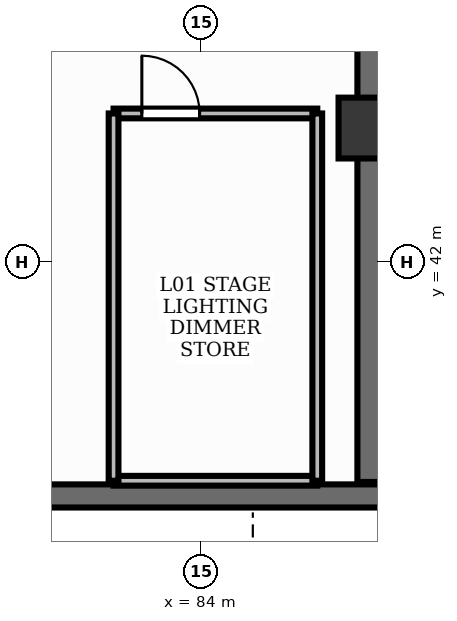
"""IFC4 building model, lengths in metres.
Left out: names, types, materials, properties, quantities, classifications, styles, units other than length and angle.
Written with IfcOpenShell. Run it as: python <this file> out.ifc"""

import sys

from ifc_helpers import new_model, si_unit, direction, frame, frame_2d, origin, origin_2d, place, context, subcontext, project, spatial, rectangle, extrude, element, fill, save


model = new_model("IFC4")
c1 = context("Model", 3, precision=1e-05, world=origin(), true_north=direction((0.0, 1.0)))
c2 = subcontext(c1, "Body", "Model", "MODEL_VIEW")
j1 = project(units=[si_unit("LENGTHUNIT", "METRE"), si_unit("PLANEANGLEUNIT", "RADIAN")], contexts=[c1])
p1 = place(None, origin())
s1 = spatial("IfcSite", under=j1, at=p1, CompositionType="ELEMENT")
p2 = place(p1, origin())
s2 = spatial("IfcBuilding", under=s1, at=p2, CompositionType="ELEMENT")
p3 = place(p2, frame((0.0, 0.0, 5.4)))
s3 = spatial("IfcBuildingStorey", under=s2, at=p3, CompositionType="ELEMENT", Elevation=5.4)
p4 = place(p3, frame((86.75, 44.2, 0.0), z_axis=(0.0, 0.0, 1.0), x_axis=(1.0, 0.0, 0.0)))
e1 = element("IfcColumn", 1, at=p4, inside=s3, PredefinedType="COLUMN", context=c2, shape_type="SweptSolid", body=[
    extrude(rectangle(XDim=1.0, YDim=1.0, at=origin_2d()), origin(), (0.0, 0.0, 1.0), 4.5),
])
p5 = place(p3, frame((86.75, 38.38, 0.0), z_axis=(0.0, 0.0, 1.0), x_axis=(0.0, 1.0, 0.0)))
e2 = element("IfcWall", 2, at=p5, inside=s3, PredefinedType="SHEAR", context=c2, shape_type="SweptSolid", body=[
    extrude(rectangle(XDim=8.41, YDim=0.38, at=frame_2d((4.205, 0.0))), origin(), (0.0, 0.0, 1.0), 4.5),
])
p6 = place(p3, frame((76.4, 38.15, 0.0), z_axis=(0.0, 0.0, 1.0), x_axis=(1.0, 0.0, 0.0)))
e3 = element("IfcWall", 3, at=p6, inside=s3, PredefinedType="SHEAR", context=c2, shape_type="SweptSolid", body=[
    extrude(rectangle(XDim=15.75, YDim=0.38, at=frame_2d((7.875, 0.0))), origin(), (0.0, 0.0, 1.0), 4.5),
])
p7 = place(p3, frame((82.55, 44.44, 0.0), z_axis=(0.0, 0.0, 1.0), x_axis=(1.0, 0.0, 0.0)))
e4 = element("IfcWall", 4, at=p7, inside=s3, PredefinedType="PARTITIONING", context=c2, shape_type="SweptSolid", body=[
    extrude(rectangle(XDim=3.35, YDim=0.16, at=frame_2d((1.675, 0.0))), origin(), (0.0, 0.0, 1.0), 3.51),
])
p8 = place(p7, frame((0.465, 0.0, 0.0)))
e5 = element("IfcOpeningElement", 5, at=p8, cuts=e4, PredefinedType="OPENING", context=c2, shape_type="SweptSolid", body=[
    extrude(rectangle(XDim=0.95, YDim=2.15, at=frame_2d((0.475, 1.075))), frame((0.0, 0.095, 0.0), z_axis=(0.0, -1.0, 0.0), x_axis=(1.0, 0.0, 0.0)), (0.0, 0.0, 1.0), 0.19),
])
p9 = place(p3, frame((85.9, 38.4, 0.0), z_axis=(0.0, 0.0, 1.0), x_axis=(-1.0, 0.0, 0.0)))
e6 = element("IfcWall", 6, at=p9, inside=s3, PredefinedType="PARTITIONING", context=c2, shape_type="SweptSolid", body=[
    extrude(rectangle(XDim=3.35, YDim=0.16, at=frame_2d((1.675, 0.0))), origin(), (0.0, 0.0, 1.0), 3.51),
])
for number, where, z_axis, x_axis in (
    (7, (82.55, 38.4, 0.0), (0.0, 0.0, 1.0), (0.0, 1.0, 0.0)),
    (8, (85.9, 44.44, 0.0), (0.0, 0.0, 1.0), (0.0, -1.0, 0.0)),
):
    element("IfcWall", number, at=place(p3, frame(where, z_axis=z_axis, x_axis=x_axis)), inside=s3, PredefinedType="PARTITIONING", context=c2, shape_type="SweptSolid", body=[
        extrude(rectangle(XDim=6.04, YDim=0.16, at=frame_2d((3.02, 0.0))), origin(), (0.0, 0.0, 1.0), 3.51),
    ])
p10 = place(p8, origin())
e9 = element("IfcDoor", 9, at=p10, inside=s3, OperationType="SINGLE_SWING_LEFT", PredefinedType="DOOR", context=c2, shape_type="SweptSolid", body=[
    extrude(rectangle(XDim=0.95, YDim=2.15, at=frame_2d((0.475, 1.075))), frame((0.0, 0.025, 0.0), z_axis=(0.0, -1.0, 0.0), x_axis=(1.0, 0.0, 0.0)), (0.0, 0.0, 1.0), 0.05),
])
fill(e5, e9)
save(model, sys.argv[1])
